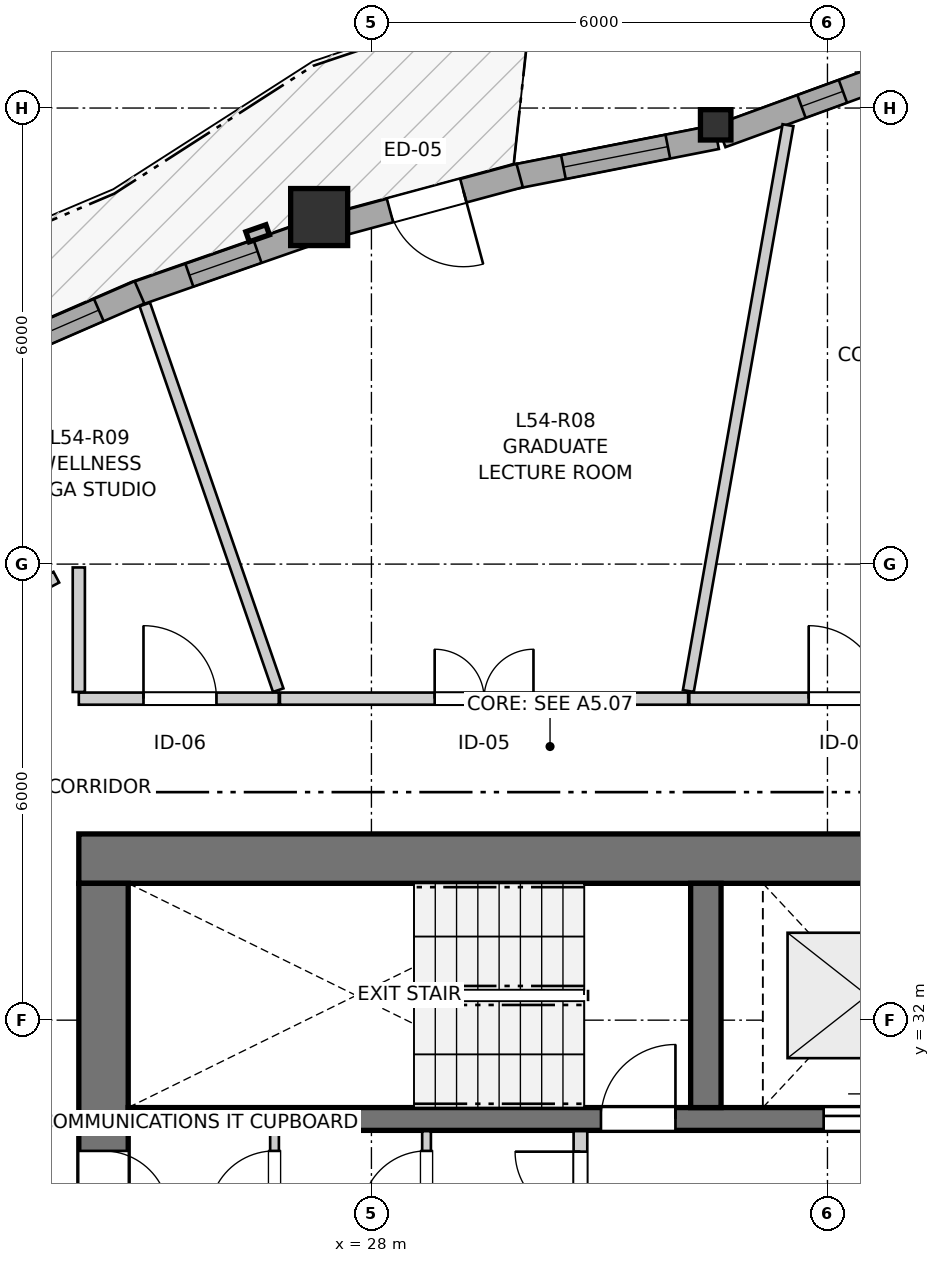
"""IFC4 building model, lengths in metres.
Left out: names, types, materials, properties, quantities, classifications, styles, units other than length and angle.
Written with IfcOpenShell. Run it as: python <this file> out.ifc"""

import sys

from ifc_helpers import new_model, si_unit, direction, frame, frame_2d, origin, origin_2d, place, context, subcontext, project, spatial, rectangle, i_section, extrude, source, transform, mapped, element, fill, save


model = new_model("IFC4")
c1 = context("Model", 3, precision=1e-05, world=origin(), true_north=direction((0.0, 1.0)))
c2 = subcontext(c1, "Body", "Model", "MODEL_VIEW")
j1 = project(units=[si_unit("LENGTHUNIT", "METRE"), si_unit("PLANEANGLEUNIT", "RADIAN")], contexts=[c1])
p1 = place(None, origin())
s1 = spatial("IfcSite", under=j1, at=p1, CompositionType="ELEMENT")
p2 = place(p1, origin())
s2 = spatial("IfcBuilding", under=s1, at=p2, CompositionType="ELEMENT")
p3 = place(p2, frame((0.0, 0.0, 181.0)))
s3 = spatial("IfcBuildingStorey", under=s2, at=p3, CompositionType="ELEMENT", Elevation=181.0)
p4 = place(p3, frame((36.55, 34.125, 0.0), z_axis=(0.0, 0.0, 1.0), x_axis=(-1.0, 0.0, 0.0)))
e1 = element("IfcWall", 1, at=p4, inside=s3, PredefinedType="SHEAR", context=c2, shape_type="SweptSolid", body=[
    extrude(rectangle(XDim=12.4, YDim=0.65, at=frame_2d((6.2, 0.0))), origin(), (0.0, 0.0, 1.0), 2.95),
])
p5 = place(p3, frame((24.475, 33.8, 0.0), z_axis=(0.0, 0.0, 1.0), x_axis=(0.0, -1.0, 0.0)))
e2 = element("IfcWall", 2, at=p5, inside=s3, PredefinedType="SHEAR", context=c2, shape_type="SweptSolid", body=[
    extrude(rectangle(XDim=15.6, YDim=0.65, at=frame_2d((7.8, 0.0))), origin(), (0.0, 0.0, 1.0), 2.95),
])
p6 = place(p5, frame((7.05, 0.0, 0.0)))
e3 = element("IfcOpeningElement", 3, at=p6, cuts=e2, PredefinedType="OPENING", context=c2, shape_type="SweptSolid", body=[
    extrude(rectangle(XDim=1.5, YDim=2.15, at=frame_2d((0.75, 1.075))), frame((0.0, 0.335, 0.0), z_axis=(0.0, -1.0, 0.0), x_axis=(1.0, 0.0, 0.0)), (0.0, 0.0, 1.0), 0.67),
])
p7 = place(p5, frame((3.52, 0.0, 0.0)))
e4 = element("IfcOpeningElement", 4, at=p7, cuts=e2, PredefinedType="OPENING", context=c2, shape_type="SweptSolid", body=[
    extrude(rectangle(XDim=0.86, YDim=2.05, at=frame_2d((0.43, 1.025))), frame((0.0, 0.335, 0.0), z_axis=(0.0, -1.0, 0.0), x_axis=(1.0, 0.0, 0.0)), (0.0, 0.0, 1.0), 0.67),
])
p8 = place(p5, frame((11.22, 0.0, 0.0)))
e5 = element("IfcOpeningElement", 5, at=p8, cuts=e2, PredefinedType="OPENING", context=c2, shape_type="SweptSolid", body=[
    extrude(rectangle(XDim=0.86, YDim=2.05, at=frame_2d((0.43, 1.025))), frame((0.0, 0.335, 0.0), z_axis=(0.0, -1.0, 0.0), x_axis=(1.0, 0.0, 0.0)), (0.0, 0.0, 1.0), 0.67),
])
p9 = place(p3, frame((24.8, 30.7, 0.0), z_axis=(0.0, 0.0, 1.0), x_axis=(1.0, 0.0, 0.0)))
e6 = element("IfcWall", 6, at=p9, inside=s3, PredefinedType="SHEAR", context=c2, shape_type="SweptSolid", body=[
    extrude(rectangle(XDim=11.1, YDim=0.3, at=frame_2d((5.55, 0.0))), origin(), (0.0, 0.0, 1.0), 2.95),
])
p10 = place(p9, frame((6.22, 0.0, 0.0)))
e7 = element("IfcOpeningElement", 7, at=p10, cuts=e6, PredefinedType="OPENING", context=c2, shape_type="SweptSolid", body=[
    extrude(rectangle(XDim=0.98, YDim=2.15, at=frame_2d((0.49, 1.075))), frame((0.0, 0.16, 0.0), z_axis=(0.0, -1.0, 0.0), x_axis=(1.0, 0.0, 0.0)), (0.0, 0.0, 1.0), 0.32),
])
p11 = place(p9, frame((9.15, 0.0, 0.0)))
e8 = element("IfcOpeningElement", 8, at=p11, cuts=e6, PredefinedType="OPENING", context=c2, shape_type="SweptSolid", body=[
    extrude(rectangle(XDim=1.15, YDim=2.15, at=frame_2d((0.575, 1.075))), frame((0.0, 0.16, 0.0), z_axis=(0.0, -1.0, 0.0), x_axis=(1.0, 0.0, 0.0)), (0.0, 0.0, 1.0), 0.32),
])
p12 = place(p3, frame((32.4, 30.85, 0.0), z_axis=(0.0, 0.0, 1.0), x_axis=(0.0, 1.0, 0.0)))
e9 = element("IfcWall", 9, at=p12, inside=s3, PredefinedType="SHEAR", context=c2, shape_type="SweptSolid", body=[
    extrude(rectangle(XDim=2.95, YDim=0.4, at=frame_2d((1.475, 0.0))), origin(), (0.0, 0.0, 1.0), 2.95),
])
m1 = source(origin(), c2, "Body", "SweptSolid", [
    extrude(i_section(OverallWidth=0.401, OverallDepth=0.399, WebThickness=0.023, FlangeThickness=0.036, FilletRadius=0.015, at=origin_2d()), origin(), (0.0, 0.0, 1.0), 2.95),
])
p13 = place(p3, frame((32.529, 43.779, 0.0), z_axis=(0.0, 0.0, 1.0), x_axis=(1.0, 0.0, 0.0)))
e10 = element("IfcColumn", 10, at=p13, inside=s3, PredefinedType="PILASTER", context=c2, shape_type="MappedRepresentation", body=[
    mapped(m1, transform((0.0, 0.0, 0.0), x_axis=(1.0, 0.0, 0.0), y_axis=(0.0, 1.0, 0.0), z_axis=(0.0, 0.0, 1.0), scale=1.0)),
])
m2 = source(origin(), c2, "Body", "SweptSolid", [
    extrude(rectangle(XDim=0.75, YDim=0.75, at=origin_2d()), origin(), (0.0, 0.0, 1.0), 2.95),
])
p14 = place(p3, frame((27.312, 42.566, 0.0), z_axis=(0.0, 0.0, 1.0), x_axis=(1.0, 0.0, 0.0)))
e11 = element("IfcColumn", 11, at=p14, inside=s3, PredefinedType="COLUMN", context=c2, shape_type="MappedRepresentation", body=[
    mapped(m2, transform((0.0, 0.0, 0.0), x_axis=(1.0, 0.0, 0.0), y_axis=(0.0, 1.0, 0.0), z_axis=(0.0, 0.0, 1.0), scale=1.0)),
])
p15 = place(p3, frame((36.456, 44.311, 0.0), z_axis=(0.0, 0.0, 1.0), x_axis=(-0.999997246765, -0.002346585115, 0.0)))
e12 = element("IfcWall", 12, at=p15, inside=s3, PredefinedType="SOLIDWALL", context=c2, shape_type="SweptSolid", body=[
    extrude(rectangle(XDim=2.081, YDim=0.32, at=frame_2d((1.041, 0.0))), origin(), (0.0, 0.0, 1.0), 2.53),
])
p16 = place(p15, frame((0.315, 0.0, 0.82)))
e13 = element("IfcOpeningElement", 13, at=p16, cuts=e12, PredefinedType="OPENING", context=c2, shape_type="SweptSolid", body=[
    extrude(rectangle(XDim=1.45, YDim=1.25, at=frame_2d((0.725, 0.625))), frame((0.0, 0.17, 0.0), z_axis=(0.0, -1.0, 0.0), x_axis=(1.0, 0.0, 0.0)), (0.0, 0.0, 1.0), 0.34),
])
p17 = place(p3, frame((34.503, 44.329, 0.0), z_axis=(0.0, 0.0, 1.0), x_axis=(-0.939387553708, -0.342857148007, 0.0)))
e14 = element("IfcWall", 14, at=p17, inside=s3, PredefinedType="SOLIDWALL", context=c2, shape_type="SweptSolid", body=[
    extrude(rectangle(XDim=2.023, YDim=0.32, at=frame_2d((1.011, 0.0))), origin(), (0.0, 0.0, 1.0), 2.53),
])
p18 = place(p17, frame((0.319, 0.0, 0.82)))
e15 = element("IfcOpeningElement", 15, at=p18, cuts=e14, PredefinedType="OPENING", context=c2, shape_type="SweptSolid", body=[
    extrude(rectangle(XDim=0.58, YDim=1.35, at=frame_2d((0.29, 0.675))), frame((0.0, 0.17, 0.0), z_axis=(0.0, -1.0, 0.0), x_axis=(1.0, 0.0, 0.0)), (0.0, 0.0, 1.0), 0.34),
])
p19 = place(p3, frame((32.541, 43.618, 0.0), z_axis=(0.0, 0.0, 1.0), x_axis=(-0.981233088351, -0.192825377804, 0.0)))
e16 = element("IfcWall", 16, at=p19, inside=s3, PredefinedType="SOLIDWALL", context=c2, shape_type="SweptSolid", body=[
    extrude(rectangle(XDim=2.726, YDim=0.32, at=frame_2d((1.363, 0.0))), origin(), (0.0, 0.0, 1.0), 2.53),
])
p20 = place(p19, frame((0.653, 0.0, 0.82)))
e17 = element("IfcOpeningElement", 17, at=p20, cuts=e16, PredefinedType="OPENING", context=c2, shape_type="SweptSolid", body=[
    extrude(rectangle(XDim=1.4, YDim=1.35, at=frame_2d((0.7, 0.675))), frame((0.0, 0.17, 0.0), z_axis=(0.0, -1.0, 0.0), x_axis=(1.0, 0.0, 0.0)), (0.0, 0.0, 1.0), 0.34),
])
p21 = place(p3, frame((29.95, 43.112, 0.0), z_axis=(0.0, 0.0, 1.0), x_axis=(-0.96543906005, -0.260628895806, 0.0)))
e18 = element("IfcWall", 18, at=p21, inside=s3, PredefinedType="SOLIDWALL", context=c2, shape_type="SweptSolid", body=[
    extrude(rectangle(XDim=2.524, YDim=0.32, at=frame_2d((1.262, 0.0))), origin(), (0.0, 0.0, 1.0), 2.53),
])
p22 = place(p21, frame((0.767, 0.0, 0.0)))
e19 = element("IfcOpeningElement", 19, at=p22, cuts=e18, PredefinedType="OPENING", context=c2, shape_type="SweptSolid", body=[
    extrude(rectangle(XDim=1.0, YDim=2.1, at=frame_2d((0.5, 1.05))), frame((0.0, 0.17, 0.0), z_axis=(0.0, -1.0, 0.0), x_axis=(1.0, 0.0, 0.0)), (0.0, 0.0, 1.0), 0.34),
])
p23 = place(p3, frame((27.209, 42.361, 0.0), z_axis=(0.0, 0.0, 1.0), x_axis=(-0.944111191945, -0.329627148829, 0.0)))
e20 = element("IfcWall", 20, at=p23, inside=s3, PredefinedType="SOLIDWALL", context=c2, shape_type="SweptSolid", body=[
    extrude(rectangle(XDim=2.481, YDim=0.32, at=frame_2d((1.241, 0.0))), origin(), (0.0, 0.0, 1.0), 2.53),
])
p24 = place(p23, frame((0.75, 0.0, 0.82)))
e21 = element("IfcOpeningElement", 21, at=p24, cuts=e20, PredefinedType="OPENING", context=c2, shape_type="SweptSolid", body=[
    extrude(rectangle(XDim=0.95, YDim=1.35, at=frame_2d((0.475, 0.675))), frame((0.0, 0.17, 0.0), z_axis=(0.0, -1.0, 0.0), x_axis=(1.0, 0.0, 0.0)), (0.0, 0.0, 1.0), 0.34),
])
p25 = place(p3, frame((24.948, 41.575, 0.0), z_axis=(0.0, 0.0, 1.0), x_axis=(-0.917095460669, -0.398667676168, 0.0)))
e22 = element("IfcWall", 22, at=p25, inside=s3, PredefinedType="SOLIDWALL", context=c2, shape_type="SweptSolid", body=[
    extrude(rectangle(XDim=2.597, YDim=0.32, at=frame_2d((1.299, 0.0))), origin(), (0.0, 0.0, 1.0), 2.53),
])
p26 = place(p25, frame((0.583, 0.0, 0.82)))
e23 = element("IfcOpeningElement", 23, at=p26, cuts=e22, PredefinedType="OPENING", context=c2, shape_type="SweptSolid", body=[
    extrude(rectangle(XDim=1.45, YDim=1.25, at=frame_2d((0.725, 0.625))), frame((0.0, 0.17, 0.0), z_axis=(0.0, -1.0, 0.0), x_axis=(1.0, 0.0, 0.0)), (0.0, 0.0, 1.0), 0.34),
])
p27 = place(p3, frame((30.75, 27.43, 0.0), z_axis=(0.0, 0.0, 1.0), x_axis=(0.0, 1.0, 0.0)))
e24 = element("IfcWall", 24, at=p27, inside=s3, PredefinedType="PARTITIONING", context=c2, shape_type="SweptSolid", body=[
    extrude(rectangle(XDim=3.11, YDim=0.18, at=frame_2d((1.555, 0.0))), origin(), (0.0, 0.0, 1.0), 2.95),
])
p28 = place(p27, frame((1.98, 0.0, 0.0)))
e25 = element("IfcOpeningElement", 25, at=p28, cuts=e24, PredefinedType="OPENING", context=c2, shape_type="SweptSolid", body=[
    extrude(rectangle(XDim=0.86, YDim=2.05, at=frame_2d((0.43, 1.025))), frame((0.0, 0.1, 0.0), z_axis=(0.0, -1.0, 0.0), x_axis=(1.0, 0.0, 0.0)), (0.0, 0.0, 1.0), 0.2),
])
p29 = place(p3, frame((26.725, 29.16, 0.0), z_axis=(0.0, 0.0, 1.0), x_axis=(0.0, 1.0, 0.0)))
e26 = element("IfcWall", 26, at=p29, inside=s3, PredefinedType="PARTITIONING", context=c2, shape_type="SweptSolid", body=[
    extrude(rectangle(XDim=1.38, YDim=0.115, at=frame_2d((0.69, 0.0))), origin(), (0.0, 0.0, 1.0), 2.95),
])
p30 = place(p29, frame((0.26, 0.0, 0.0)))
e27 = element("IfcOpeningElement", 27, at=p30, cuts=e26, PredefinedType="OPENING", context=c2, shape_type="SweptSolid", body=[
    extrude(rectangle(XDim=0.86, YDim=2.05, at=frame_2d((0.43, 1.025))), frame((0.0, 0.067, 0.0), z_axis=(0.0, -1.0, 0.0), x_axis=(1.0, 0.0, 0.0)), (0.0, 0.0, 1.0), 0.135),
])
p31 = place(p3, frame((28.725, 29.16, 0.0), z_axis=(0.0, 0.0, 1.0), x_axis=(0.0, 1.0, 0.0)))
e28 = element("IfcWall", 28, at=p31, inside=s3, PredefinedType="PARTITIONING", context=c2, shape_type="SweptSolid", body=[
    extrude(rectangle(XDim=1.38, YDim=0.115, at=frame_2d((0.69, 0.0))), origin(), (0.0, 0.0, 1.0), 2.95),
])
p32 = place(p31, frame((0.26, 0.0, 0.0)))
e29 = element("IfcOpeningElement", 29, at=p32, cuts=e28, PredefinedType="OPENING", context=c2, shape_type="SweptSolid", body=[
    extrude(rectangle(XDim=0.86, YDim=2.05, at=frame_2d((0.43, 1.025))), frame((0.0, 0.067, 0.0), z_axis=(0.0, -1.0, 0.0), x_axis=(1.0, 0.0, 0.0)), (0.0, 0.0, 1.0), 0.135),
])
p33 = place(p3, frame((26.796, 36.23, 0.0), z_axis=(0.0, 0.0, 1.0), x_axis=(1.0, 0.0, 0.0)))
e30 = element("IfcWall", 30, at=p33, inside=s3, PredefinedType="PARTITIONING", context=c2, shape_type="SweptSolid", body=[
    extrude(rectangle(XDim=5.371, YDim=0.16, at=frame_2d((2.686, 0.0))), origin(), (0.0, 0.0, 1.0), 2.95),
])
p34 = place(p33, frame((2.036, 0.0, 0.0)))
e31 = element("IfcOpeningElement", 31, at=p34, cuts=e30, PredefinedType="OPENING", context=c2, shape_type="SweptSolid", body=[
    extrude(rectangle(XDim=1.3, YDim=2.1, at=frame_2d((0.65, 1.05))), frame((0.0, 0.09, 0.0), z_axis=(0.0, -1.0, 0.0), x_axis=(1.0, 0.0, 0.0)), (0.0, 0.0, 1.0), 0.18),
])
p35 = place(p3, frame((32.182, 36.23, 0.0), z_axis=(0.0, 0.0, 1.0), x_axis=(1.0, 0.0, 0.0)))
e32 = element("IfcWall", 32, at=p35, inside=s3, PredefinedType="PARTITIONING", context=c2, shape_type="SweptSolid", body=[
    extrude(rectangle(XDim=4.149, YDim=0.16, at=frame_2d((2.075, 0.0))), origin(), (0.0, 0.0, 1.0), 2.588),
])
p36 = place(p35, frame((1.571, 0.0, 0.0)))
e33 = element("IfcOpeningElement", 33, at=p36, cuts=e32, PredefinedType="OPENING", context=c2, shape_type="SweptSolid", body=[
    extrude(rectangle(XDim=0.96, YDim=2.1, at=frame_2d((0.48, 1.05))), frame((0.0, 0.09, 0.0), z_axis=(0.0, -1.0, 0.0), x_axis=(1.0, 0.0, 0.0)), (0.0, 0.0, 1.0), 0.18),
])
p37 = place(p3, frame((24.15, 36.23, 0.0), z_axis=(0.0, 0.0, 1.0), x_axis=(1.0, 0.0, 0.0)))
e34 = element("IfcWall", 34, at=p37, inside=s3, PredefinedType="PARTITIONING", context=c2, shape_type="SweptSolid", body=[
    extrude(rectangle(XDim=2.631, YDim=0.16, at=frame_2d((1.315, 0.0))), origin(), (0.0, 0.0, 1.0), 2.95),
])
p38 = place(p37, frame((0.851, 0.0, 0.0)))
e35 = element("IfcOpeningElement", 35, at=p38, cuts=e34, PredefinedType="OPENING", context=c2, shape_type="SweptSolid", body=[
    extrude(rectangle(XDim=0.96, YDim=2.1, at=frame_2d((0.48, 1.05))), frame((0.0, 0.09, 0.0), z_axis=(0.0, -1.0, 0.0), x_axis=(1.0, 0.0, 0.0)), (0.0, 0.0, 1.0), 0.18),
])
p39 = place(p3, frame((32.17, 36.331, 0.0), z_axis=(0.0, 0.0, 1.0), x_axis=(0.173479457804, 0.984837487975, 0.0)))
e36 = element("IfcWall", 36, at=p39, inside=s3, PredefinedType="PARTITIONING", context=c2, shape_type="SweptSolid", body=[
    extrude(rectangle(XDim=7.559, YDim=0.145, at=frame_2d((3.779, 0.0))), origin(), (0.0, 0.0, 1.0), 2.95),
])
p40 = place(p3, frame((25.019, 41.416, 0.0), z_axis=(0.0, 0.0, 1.0), x_axis=(0.326820085254, -0.945086573746, 0.0)))
e37 = element("IfcWall", 37, at=p40, inside=s3, PredefinedType="PARTITIONING", context=c2, shape_type="SweptSolid", body=[
    extrude(rectangle(XDim=5.37, YDim=0.145, at=frame_2d((2.685, 0.0))), origin(), (0.0, 0.0, 1.0), 2.95),
])
p41 = place(p3, frame((24.15, 36.318, 0.0), z_axis=(0.0, 0.0, 1.0), x_axis=(0.0, 1.0, 0.0)))
e38 = element("IfcWall", 38, at=p41, inside=s3, PredefinedType="PARTITIONING", context=c2, shape_type="SweptSolid", body=[
    extrude(rectangle(XDim=1.638, YDim=0.16, at=frame_2d((0.819, 0.0))), origin(), (0.0, 0.0, 1.0), 2.95),
])
p42 = place(p3, frame((22.37, 37.045, 0.0), z_axis=(0.0, 0.0, 1.0), x_axis=(0.884434803915, 0.466663773635, 0.0)))
e39 = element("IfcWall", 39, at=p42, inside=s3, PredefinedType="PARTITIONING", context=c2, shape_type="SweptSolid", body=[
    extrude(rectangle(XDim=1.678, YDim=0.16, at=frame_2d((0.839, 0.0))), origin(), (0.0, 0.0, 1.0), 2.558),
])
m3 = source(origin(), c2, "Body", "SweptSolid", [
    extrude(rectangle(XDim=0.58, YDim=1.35, at=frame_2d((0.29, 0.675))), frame((0.0, 0.03, 0.0), z_axis=(0.0, -1.0, 0.0), x_axis=(1.0, 0.0, 0.0)), (0.0, 0.0, 1.0), 0.06),
])
p43 = place(p18, origin())
e40 = element("IfcWindow", 40, at=p43, inside=s3, PartitioningType="SINGLE_PANEL", PredefinedType="WINDOW", context=c2, shape_type="MappedRepresentation", body=[
    mapped(m3, transform((0.0, 0.0, 0.0), x_axis=(1.0, 0.0, 0.0), y_axis=(0.0, 1.0, 0.0), z_axis=(0.0, 0.0, 1.0), scale=1.0)),
])
fill(e15, e40)
m4 = source(origin(), c2, "Body", "SweptSolid", [
    extrude(rectangle(XDim=1.4, YDim=1.35, at=frame_2d((0.7, 0.675))), frame((0.0, 0.03, 0.0), z_axis=(0.0, -1.0, 0.0), x_axis=(1.0, 0.0, 0.0)), (0.0, 0.0, 1.0), 0.06),
])
p44 = place(p20, origin())
e41 = element("IfcWindow", 41, at=p44, inside=s3, PartitioningType="SINGLE_PANEL", PredefinedType="WINDOW", context=c2, shape_type="MappedRepresentation", body=[
    mapped(m4, transform((0.0, 0.0, 0.0), x_axis=(1.0, 0.0, 0.0), y_axis=(0.0, 1.0, 0.0), z_axis=(0.0, 0.0, 1.0), scale=1.0)),
])
fill(e17, e41)
m5 = source(origin(), c2, "Body", "SweptSolid", [
    extrude(rectangle(XDim=1.0, YDim=2.1, at=frame_2d((0.5, 1.05))), frame((0.0, 0.025, 0.0), z_axis=(0.0, -1.0, 0.0), x_axis=(1.0, 0.0, 0.0)), (0.0, 0.0, 1.0), 0.05),
])
p45 = place(p22, origin())
e42 = element("IfcDoor", 42, at=p45, inside=s3, OperationType="SINGLE_SWING_LEFT", PredefinedType="DOOR", context=c2, shape_type="MappedRepresentation", body=[
    mapped(m5, transform((0.0, 0.0, 0.0), x_axis=(1.0, 0.0, 0.0), y_axis=(0.0, 1.0, 0.0), z_axis=(0.0, 0.0, 1.0), scale=1.0)),
])
fill(e19, e42)
m6 = source(origin(), c2, "Body", "SweptSolid", [
    extrude(rectangle(XDim=0.95, YDim=1.35, at=frame_2d((0.475, 0.675))), frame((0.0, 0.03, 0.0), z_axis=(0.0, -1.0, 0.0), x_axis=(1.0, 0.0, 0.0)), (0.0, 0.0, 1.0), 0.06),
])
p46 = place(p24, origin())
e43 = element("IfcWindow", 43, at=p46, inside=s3, PartitioningType="SINGLE_PANEL", PredefinedType="WINDOW", context=c2, shape_type="MappedRepresentation", body=[
    mapped(m6, transform((0.0, 0.0, 0.0), x_axis=(1.0, 0.0, 0.0), y_axis=(0.0, 1.0, 0.0), z_axis=(0.0, 0.0, 1.0), scale=1.0)),
])
fill(e21, e43)
m7 = source(origin(), c2, "Body", "SweptSolid", [
    extrude(rectangle(XDim=1.45, YDim=1.25, at=frame_2d((0.725, 0.625))), frame((0.0, 0.03, 0.0), z_axis=(0.0, -1.0, 0.0), x_axis=(1.0, 0.0, 0.0)), (0.0, 0.0, 1.0), 0.06),
])
p47 = place(p26, origin())
e44 = element("IfcWindow", 44, at=p47, inside=s3, PartitioningType="SINGLE_PANEL", PredefinedType="WINDOW", context=c2, shape_type="MappedRepresentation", body=[
    mapped(m7, transform((0.0, 0.0, 0.0), x_axis=(1.0, 0.0, 0.0), y_axis=(0.0, 1.0, 0.0), z_axis=(0.0, 0.0, 1.0), scale=1.0)),
])
fill(e23, e44)
m8 = source(origin(), c2, "Body", "SweptSolid", [
    extrude(rectangle(XDim=0.98, YDim=2.15, at=frame_2d((0.49, 1.075))), frame((0.0, 0.025, 0.0), z_axis=(0.0, -1.0, 0.0), x_axis=(1.0, 0.0, 0.0)), (0.0, 0.0, 1.0), 0.05),
])
p48 = place(p10, origin())
e45 = element("IfcDoor", 45, at=p48, inside=s3, OperationType="SINGLE_SWING_RIGHT", PredefinedType="DOOR", context=c2, shape_type="MappedRepresentation", body=[
    mapped(m8, transform((0.0, 0.0, 0.0), x_axis=(1.0, 0.0, 0.0), y_axis=(0.0, 1.0, 0.0), z_axis=(0.0, 0.0, 1.0), scale=1.0)),
])
fill(e7, e45)
m9 = source(origin(), c2, "Body", "SweptSolid", [
    extrude(rectangle(XDim=1.15, YDim=2.15, at=frame_2d((0.575, 1.075))), frame((0.0, 0.025, 0.0), z_axis=(0.0, -1.0, 0.0), x_axis=(1.0, 0.0, 0.0)), (0.0, 0.0, 1.0), 0.05),
])
p49 = place(p11, origin())
e46 = element("IfcDoor", 46, at=p49, inside=s3, OperationType="DOUBLE_DOOR_SLIDING", PredefinedType="DOOR", context=c2, shape_type="MappedRepresentation", body=[
    mapped(m9, transform((0.0, 0.0, 0.0), x_axis=(1.0, 0.0, 0.0), y_axis=(0.0, 1.0, 0.0), z_axis=(0.0, 0.0, 1.0), scale=1.0)),
])
fill(e8, e46)
m10 = source(origin(), c2, "Body", "SweptSolid", [
    extrude(rectangle(XDim=0.86, YDim=2.05, at=frame_2d((0.43, 1.025))), frame((0.0, 0.025, 0.0), z_axis=(0.0, -1.0, 0.0), x_axis=(1.0, 0.0, 0.0)), (0.0, 0.0, 1.0), 0.05),
])
p50 = place(p7, origin())
e47 = element("IfcDoor", 47, at=p50, inside=s3, OperationType="SINGLE_SWING_RIGHT", PredefinedType="DOOR", context=c2, shape_type="MappedRepresentation", body=[
    mapped(m10, transform((0.0, 0.0, 0.0), x_axis=(1.0, 0.0, 0.0), y_axis=(0.0, 1.0, 0.0), z_axis=(0.0, 0.0, 1.0), scale=1.0)),
])
fill(e4, e47)
p51 = place(p28, origin())
e48 = element("IfcDoor", 48, at=p51, inside=s3, OperationType="SINGLE_SWING_RIGHT", PredefinedType="DOOR", context=c2, shape_type="MappedRepresentation", body=[
    mapped(m10, transform((0.0, 0.0, 0.0), x_axis=(1.0, 0.0, 0.0), y_axis=(0.0, 1.0, 0.0), z_axis=(0.0, 0.0, 1.0), scale=1.0)),
])
fill(e25, e48)
p52 = place(p30, origin())
e49 = element("IfcDoor", 49, at=p52, inside=s3, OperationType="SINGLE_SWING_LEFT", PredefinedType="DOOR", context=c2, shape_type="MappedRepresentation", body=[
    mapped(m10, transform((0.0, 0.0, 0.0), x_axis=(1.0, 0.0, 0.0), y_axis=(0.0, 1.0, 0.0), z_axis=(0.0, 0.0, 1.0), scale=1.0)),
])
fill(e27, e49)
p53 = place(p32, origin())
e50 = element("IfcDoor", 50, at=p53, inside=s3, OperationType="SINGLE_SWING_LEFT", PredefinedType="DOOR", context=c2, shape_type="MappedRepresentation", body=[
    mapped(m10, transform((0.0, 0.0, 0.0), x_axis=(1.0, 0.0, 0.0), y_axis=(0.0, 1.0, 0.0), z_axis=(0.0, 0.0, 1.0), scale=1.0)),
])
fill(e29, e50)
m11 = source(origin(), c2, "Body", "SweptSolid", [
    extrude(rectangle(XDim=1.3, YDim=2.1, at=frame_2d((0.65, 1.05))), frame((0.0, 0.025, 0.0), z_axis=(0.0, -1.0, 0.0), x_axis=(1.0, 0.0, 0.0)), (0.0, 0.0, 1.0), 0.05),
])
p54 = place(p34, origin())
e51 = element("IfcDoor", 51, at=p54, inside=s3, OperationType="DOUBLE_DOOR_SINGLE_SWING", PredefinedType="DOOR", context=c2, shape_type="MappedRepresentation", body=[
    mapped(m11, transform((0.0, 0.0, 0.0), x_axis=(1.0, 0.0, 0.0), y_axis=(0.0, 1.0, 0.0), z_axis=(0.0, 0.0, 1.0), scale=1.0)),
])
fill(e31, e51)
m12 = source(origin(), c2, "Body", "SweptSolid", [
    extrude(rectangle(XDim=0.96, YDim=2.1, at=frame_2d((0.48, 1.05))), frame((0.0, 0.025, 0.0), z_axis=(0.0, -1.0, 0.0), x_axis=(1.0, 0.0, 0.0)), (0.0, 0.0, 1.0), 0.05),
])
p55 = place(p36, origin())
e52 = element("IfcDoor", 52, at=p55, inside=s3, OperationType="SINGLE_SWING_LEFT", PredefinedType="DOOR", context=c2, shape_type="MappedRepresentation", body=[
    mapped(m12, transform((0.0, 0.0, 0.0), x_axis=(1.0, 0.0, 0.0), y_axis=(0.0, 1.0, 0.0), z_axis=(0.0, 0.0, 1.0), scale=1.0)),
])
fill(e33, e52)
p56 = place(p38, origin())
e53 = element("IfcDoor", 53, at=p56, inside=s3, OperationType="SINGLE_SWING_LEFT", PredefinedType="DOOR", context=c2, shape_type="MappedRepresentation", body=[
    mapped(m12, transform((0.0, 0.0, 0.0), x_axis=(1.0, 0.0, 0.0), y_axis=(0.0, 1.0, 0.0), z_axis=(0.0, 0.0, 1.0), scale=1.0)),
])
fill(e35, e53)
save(model, sys.argv[1])
